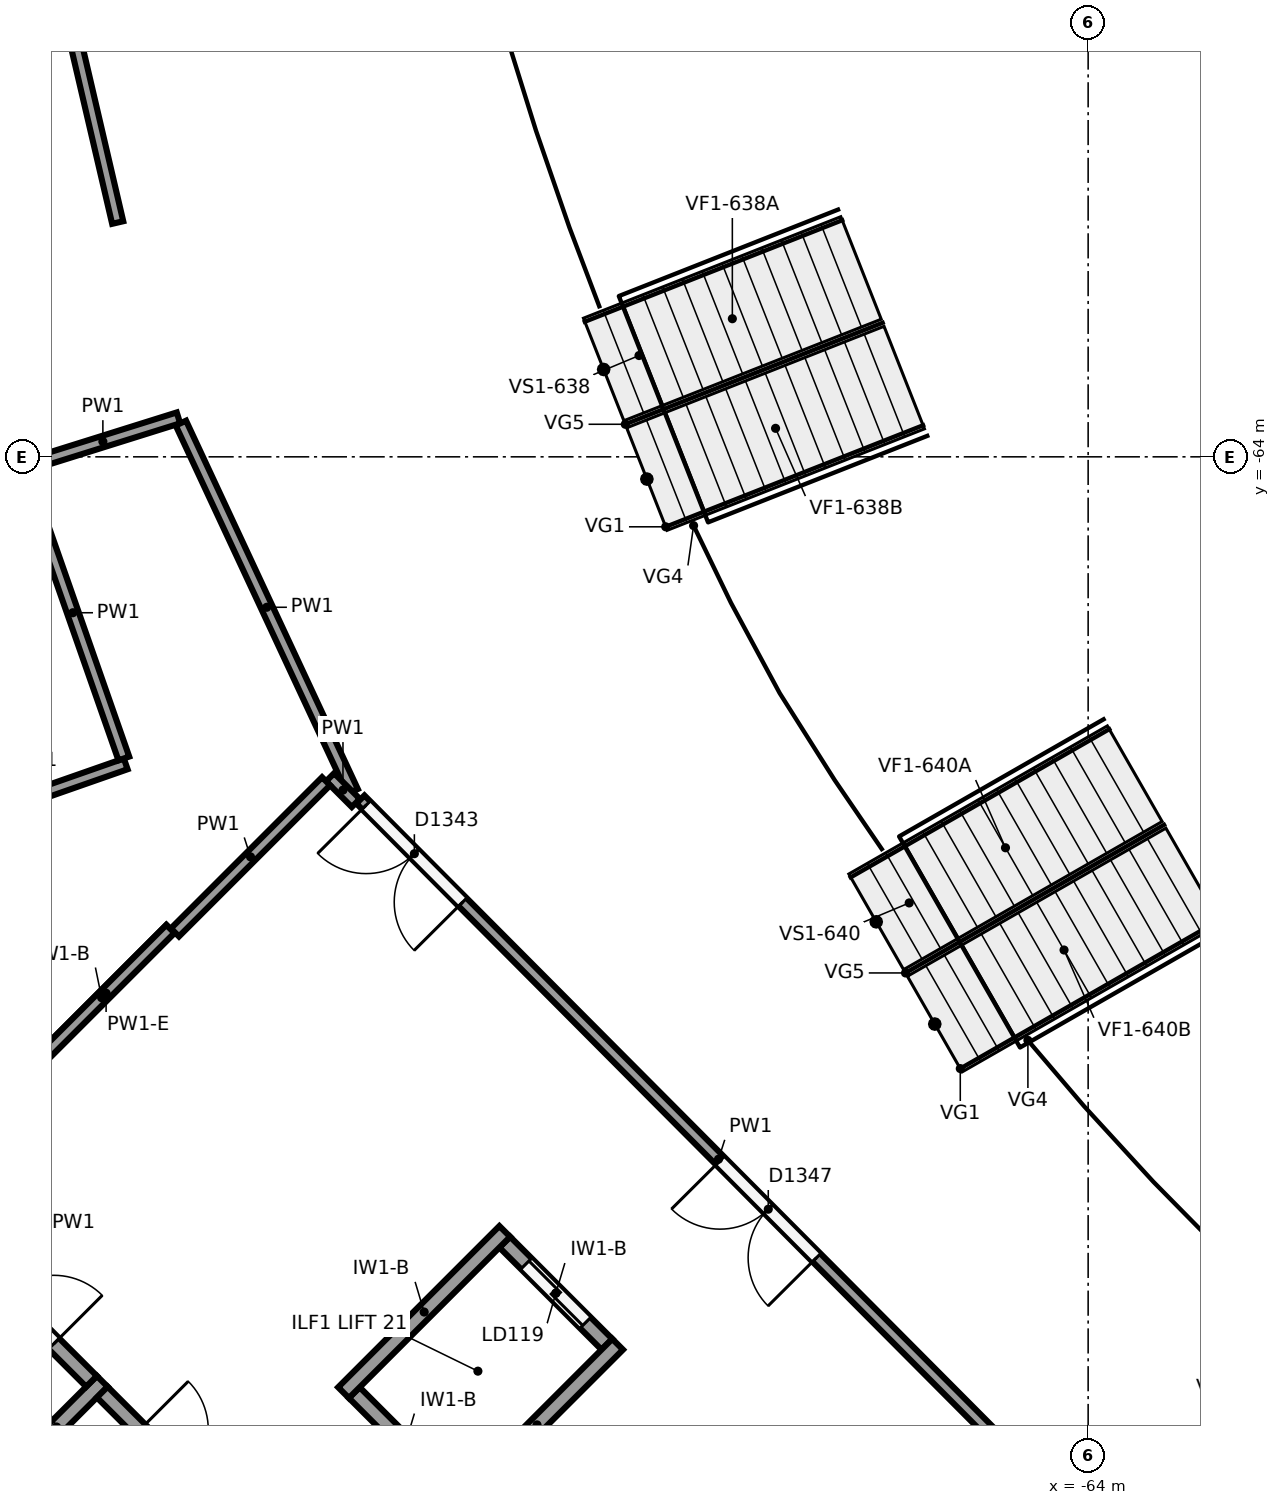
"""IFC4 building model, lengths in metres.
Left out: names, types, materials, properties, quantities, classifications, styles, units other than length and angle.
Written with IfcOpenShell. Run it as: python <this file> out.ifc"""

import sys

from ifc_helpers import new_model, si_unit, direction, frame, frame_2d, origin, origin_2d, place, context, subcontext, project, spatial, rectangle, circle, extrude, element, fill, save


model = new_model("IFC4")
c1 = context("Model", 3, precision=1e-05, world=origin(), true_north=direction((0.0, 1.0)))
c2 = subcontext(c1, "Body", "Model", "MODEL_VIEW")
j1 = project(units=[si_unit("LENGTHUNIT", "METRE"), si_unit("PLANEANGLEUNIT", "RADIAN")], contexts=[c1])
p1 = place(None, origin())
s1 = spatial("IfcSite", under=j1, at=p1, CompositionType="ELEMENT")
p2 = place(p1, origin())
s2 = spatial("IfcBuilding", under=s1, at=p2, CompositionType="ELEMENT")
p3 = place(p2, frame((0.0, 0.0, 18.0)))
s3 = spatial("IfcBuildingStorey", under=s2, at=p3, CompositionType="ELEMENT", Elevation=18.0)
p4 = place(p3, frame((-71.17, -59.677, 0.0), z_axis=(0.0, 0.0, 1.0), x_axis=(1.0, 0.0, 0.0)))
e1 = element("IfcColumn", 1, at=p4, inside=s3, PredefinedType="COLUMN", context=c2, shape_type="SweptSolid", body=[
    extrude(circle(Radius=0.45, at=origin_2d()), origin(), (0.0, 0.0, 1.0), 3.698),
])
p5 = place(p3, frame((-67.972, -67.058, 0.0), z_axis=(0.0, 0.0, 1.0), x_axis=(1.0, 0.0, 0.0)))
e2 = element("IfcColumn", 2, at=p5, inside=s3, PredefinedType="COLUMN", context=c2, shape_type="SweptSolid", body=[
    extrude(circle(Radius=0.45, at=origin_2d()), origin(), (0.0, 0.0, 1.0), 3.954),
])
p6 = place(p3, frame((-63.068, -73.47, 0.0), z_axis=(0.0, 0.0, 1.0), x_axis=(1.0, 0.0, 0.0)))
e3 = element("IfcColumn", 3, at=p6, inside=s3, PredefinedType="COLUMN", context=c2, shape_type="SweptSolid", body=[
    extrude(circle(Radius=0.45, at=origin_2d()), origin(), (0.0, 0.0, 1.0), 4.121),
])
p7 = place(p3, frame((-78.173, -77.365, 0.0), z_axis=(0.0, 0.0, 1.0), x_axis=(0.707178586901, 0.707034968179, 0.0)))
e4 = element("IfcWall", 4, at=p7, inside=s3, PredefinedType="SHEAR", context=c2, shape_type="SweptSolid", body=[
    extrude(rectangle(XDim=1.7, YDim=0.2, at=frame_2d((0.85, 0.0))), origin(), (0.0, 0.0, 1.0), 5.6),
])
p8 = place(p3, frame((-79.375, -73.9, 0.0), z_axis=(0.0, 0.0, 1.0), x_axis=(0.707068634461, -0.707144925854, 0.0)))
e5 = element("IfcWall", 5, at=p8, inside=s3, PredefinedType="SHEAR", context=c2, shape_type="SweptSolid", body=[
    extrude(rectangle(XDim=3.2, YDim=0.2, at=frame_2d((1.6, 0.0))), origin(), (0.0, 0.0, 1.0), 5.6),
])
p9 = place(p8, frame((0.7, 0.0, 0.0)))
e6 = element("IfcOpeningElement", 6, at=p9, cuts=e5, PredefinedType="OPENING", context=c2, shape_type="SweptSolid", body=[
    extrude(rectangle(XDim=1.8, YDim=2.1, at=frame_2d((0.9, 1.05))), frame((0.0, 0.11, 0.0), z_axis=(0.0, -1.0, 0.0), x_axis=(1.0, 0.0, 0.0)), (0.0, 0.0, 1.0), 0.22),
])
p10 = place(p3, frame((-76.971, -76.304, 0.0), z_axis=(0.0, 0.0, 1.0), x_axis=(0.707106781187, -0.707106781187, 0.0)))
e7 = element("IfcWall", 7, at=p10, inside=s3, PredefinedType="SHEAR", context=c2, shape_type="SweptSolid", body=[
    extrude(rectangle(XDim=3.2, YDim=0.2, at=frame_2d((1.6, 0.0))), origin(), (0.0, 0.0, 1.0), 5.6),
])
p11 = place(p10, frame((0.7, 0.0, 0.0)))
e8 = element("IfcOpeningElement", 8, at=p11, cuts=e7, PredefinedType="OPENING", context=c2, shape_type="SweptSolid", body=[
    extrude(rectangle(XDim=1.8, YDim=2.1, at=frame_2d((0.9, 1.05))), frame((0.0, 0.11, 0.0), z_axis=(0.0, -1.0, 0.0), x_axis=(1.0, 0.0, 0.0)), (0.0, 0.0, 1.0), 0.22),
])
for number, where, z_axis, x_axis in (
    (9, (-73.797, -76.312, 0.0), (0.0, 0.0, 1.0), (0.707, 0.707, 0.0)),
    (10, (-72.312, -77.797, 0.0), (0.0, 0.0, 1.0), (0.707, 0.707, 0.0)),
):
    element("IfcWall", number, at=place(p3, frame(where, z_axis=z_axis, x_axis=x_axis)), inside=s3, PredefinedType="SHEAR", context=c2, shape_type="SweptSolid", body=[
        extrude(rectangle(XDim=3.0, YDim=0.2, at=frame_2d((1.5, 0.0))), origin(), (0.0, 0.0, 1.0), 4.6),
    ])
p12 = place(p3, frame((-73.656, -76.312, 0.0), z_axis=(0.0, 0.0, 1.0), x_axis=(0.707106781187, -0.707106781187, 0.0)))
e11 = element("IfcWall", 11, at=p12, inside=s3, PredefinedType="SHEAR", context=c2, shape_type="SweptSolid", body=[
    extrude(rectangle(XDim=1.9, YDim=0.2, at=frame_2d((0.95, 0.0))), origin(), (0.0, 0.0, 1.0), 4.6),
])
p13 = place(p3, frame((-71.676, -74.332, 0.0), z_axis=(0.0, 0.0, 1.0), x_axis=(0.707106781187, -0.707106781187, 0.0)))
e12 = element("IfcWall", 12, at=p13, inside=s3, PredefinedType="SHEAR", context=c2, shape_type="SweptSolid", body=[
    extrude(rectangle(XDim=1.9, YDim=0.2, at=frame_2d((0.95, 0.0))), origin(), (0.0, 0.0, 1.0), 4.6),
])
p14 = place(p13, frame((0.4, 0.0, 0.0)))
e13 = element("IfcOpeningElement", 13, at=p14, cuts=e12, PredefinedType="OPENING", context=c2, shape_type="SweptSolid", body=[
    extrude(rectangle(XDim=1.1, YDim=2.1, at=frame_2d((0.55, 1.05))), frame((0.0, 0.11, 0.0), z_axis=(0.0, -1.0, 0.0), x_axis=(1.0, 0.0, 0.0)), (0.0, 0.0, 1.0), 0.22),
])
p15 = place(p3, frame((-76.768, -60.918, 0.0), z_axis=(0.0, 0.0, 1.0), x_axis=(-0.226944673482, 0.973907652284, 0.0)))
e14 = element("IfcWall", 14, at=p15, inside=s3, PredefinedType="PARTITIONING", context=c2, shape_type="SweptSolid", body=[
    extrude(rectangle(XDim=7.882, YDim=0.15, at=frame_2d((3.941, 0.0))), origin(), (0.0, 0.0, 1.0), 3.332),
])
p16 = place(p3, frame((-79.009, -68.861, 0.0), z_axis=(0.0, 0.0, 1.0), x_axis=(0.943873667714, 0.330306674768, 0.0)))
e15 = element("IfcWall", 15, at=p16, inside=s3, PredefinedType="PARTITIONING", context=c2, shape_type="SweptSolid", body=[
    extrude(rectangle(XDim=2.486, YDim=0.15, at=frame_2d((1.243, 0.0))), origin(), (0.0, 0.0, 1.0), 5.6),
])
p17 = place(p3, frame((-76.688, -67.969, 0.0), z_axis=(0.0, 0.0, 1.0), x_axis=(-0.330235334568, 0.943898630046, 0.0)))
e16 = element("IfcWall", 16, at=p17, inside=s3, PredefinedType="PARTITIONING", context=c2, shape_type="SweptSolid", body=[
    extrude(rectangle(XDim=4.063, YDim=0.15, at=frame_2d((2.032, 0.0))), origin(), (0.0, 0.0, 1.0), 5.6),
])
p18 = place(p3, frame((-77.958, -64.111, 0.0), z_axis=(0.0, 0.0, 1.0), x_axis=(0.954210746555, 0.299135172051, 0.0)))
e17 = element("IfcWall", 17, at=p18, inside=s3, PredefinedType="PARTITIONING", context=c2, shape_type="SweptSolid", body=[
    extrude(rectangle(XDim=2.084, YDim=0.15, at=frame_2d((1.042, 0.0))), origin(), (0.0, 0.0, 1.0), 5.6),
])
p19 = place(p3, frame((-75.937, -63.556, 0.0), z_axis=(0.0, 0.0, 1.0), x_axis=(0.422630512429, -0.906302074346, 0.0)))
e18 = element("IfcWall", 18, at=p19, inside=s3, PredefinedType="PARTITIONING", context=c2, shape_type="SweptSolid", body=[
    extrude(rectangle(XDim=5.347, YDim=0.15, at=frame_2d((2.674, 0.0))), origin(), (0.0, 0.0, 1.0), 5.6),
])
p20 = place(p3, frame((-73.635, -68.554, 0.0), z_axis=(0.0, 0.0, 1.0), x_axis=(-0.707106781187, 0.707106781187, 0.0)))
e19 = element("IfcWall", 19, at=p20, inside=s3, PredefinedType="PARTITIONING", context=c2, shape_type="SweptSolid", body=[
    extrude(rectangle(XDim=0.478, YDim=0.15, at=frame_2d((0.239, 0.0))), origin(), (0.0, 0.0, 1.0), 5.6),
])
p21 = place(p3, frame((-74.027, -68.269, 0.0), z_axis=(0.0, 0.0, 1.0), x_axis=(-0.707106781187, -0.707106781187, 0.0)))
e20 = element("IfcWall", 20, at=p21, inside=s3, PredefinedType="PARTITIONING", context=c2, shape_type="SweptSolid", body=[
    extrude(rectangle(XDim=2.812, YDim=0.15, at=frame_2d((1.406, 0.0))), origin(), (0.0, 0.0, 1.0), 5.6),
])
p22 = place(p3, frame((-64.152, -77.974, 0.0), z_axis=(0.0, 0.0, 1.0), x_axis=(-0.705496399325, 0.70871350385, 0.0)))
e21 = element("IfcWall", 21, at=p22, inside=s3, PredefinedType="PARTITIONING", context=c2, shape_type="SweptSolid", body=[
    extrude(rectangle(XDim=13.356, YDim=0.15, at=frame_2d((6.678, 0.0))), origin(), (0.0, 0.0, 1.0), 5.6),
])
p23 = place(p22, frame((4.85, 0.0, 0.0)))
e22 = element("IfcOpeningElement", 22, at=p23, cuts=e21, PredefinedType="OPENING", context=c2, shape_type="SweptSolid", body=[
    extrude(rectangle(XDim=1.8, YDim=2.1, at=frame_2d((0.9, 1.05))), frame((0.0, 0.085, 0.0), z_axis=(0.0, -1.0, 0.0), x_axis=(1.0, 0.0, 0.0)), (0.0, 0.0, 1.0), 0.17),
])
p24 = place(p22, frame((11.45, 0.0, 0.0)))
e23 = element("IfcOpeningElement", 23, at=p24, cuts=e21, PredefinedType="OPENING", context=c2, shape_type="SweptSolid", body=[
    extrude(rectangle(XDim=1.8, YDim=2.1, at=frame_2d((0.9, 1.05))), frame((0.0, 0.085, 0.0), z_axis=(0.0, -1.0, 0.0), x_axis=(1.0, 0.0, 0.0)), (0.0, 0.0, 1.0), 0.17),
])
p25 = place(p3, frame((-76.075, -70.211, 0.0), z_axis=(0.0, 0.0, 1.0), x_axis=(-0.707106781187, -0.707106781187, 0.0)))
e24 = element("IfcWall", 24, at=p25, inside=s3, PredefinedType="PARTITIONING", context=c2, shape_type="SweptSolid", body=[
    extrude(rectangle(XDim=2.558, YDim=0.15, at=frame_2d((1.279, 0.0))), origin(), (0.0, 0.0, 1.0), 4.5),
])
p26 = place(p3, frame((-76.075, -70.211, 4.5), z_axis=(0.0, 0.0, 1.0), x_axis=(-0.707157815561, -0.707055743128, 0.0)))
e25 = element("IfcWall", 25, at=p26, inside=s3, PredefinedType="PARTITIONING", context=c2, shape_type="SweptSolid", body=[
    extrude(rectangle(XDim=2.392, YDim=0.15, at=frame_2d((1.196, 0.0))), origin(), (0.0, 0.0, 1.0), 1.1),
])
p27 = place(p9, origin())
e26 = element("IfcDoor", 26, at=p27, inside=s3, OperationType="DOUBLE_DOOR_SINGLE_SWING", PredefinedType="DOOR", context=c2, shape_type="SweptSolid", body=[
    extrude(rectangle(XDim=1.8, YDim=2.1, at=frame_2d((0.9, 1.05))), frame((0.0, 0.025, 0.0), z_axis=(0.0, -1.0, 0.0), x_axis=(1.0, 0.0, 0.0)), (0.0, 0.0, 1.0), 0.05),
])
fill(e6, e26)
p28 = place(p14, origin())
e27 = element("IfcDoor", 27, at=p28, inside=s3, OperationType="SLIDING_TO_LEFT", PredefinedType="DOOR", context=c2, shape_type="SweptSolid", body=[
    extrude(rectangle(XDim=1.1, YDim=2.1, at=frame_2d((0.55, 1.05))), frame((0.0, 0.025, 0.0), z_axis=(0.0, -1.0, 0.0), x_axis=(1.0, 0.0, 0.0)), (0.0, 0.0, 1.0), 0.05),
])
fill(e13, e27)
p29 = place(p23, origin())
e28 = element("IfcDoor", 28, at=p29, inside=s3, OperationType="DOUBLE_DOOR_SINGLE_SWING", PredefinedType="DOOR", context=c2, shape_type="SweptSolid", body=[
    extrude(rectangle(XDim=1.8, YDim=2.1, at=frame_2d((0.9, 1.05))), frame((0.0, 0.025, 0.0), z_axis=(0.0, -1.0, 0.0), x_axis=(1.0, 0.0, 0.0)), (0.0, 0.0, 1.0), 0.05),
])
fill(e22, e28)
p30 = place(p24, origin())
e29 = element("IfcDoor", 29, at=p30, inside=s3, OperationType="DOUBLE_DOOR_SINGLE_SWING", PredefinedType="DOOR", context=c2, shape_type="SweptSolid", body=[
    extrude(rectangle(XDim=1.8, YDim=2.1, at=frame_2d((0.9, 1.05))), frame((0.0, 0.025, 0.0), z_axis=(0.0, -1.0, 0.0), x_axis=(1.0, 0.0, 0.0)), (0.0, 0.0, 1.0), 0.05),
])
fill(e23, e29)
save(model, sys.argv[1])
